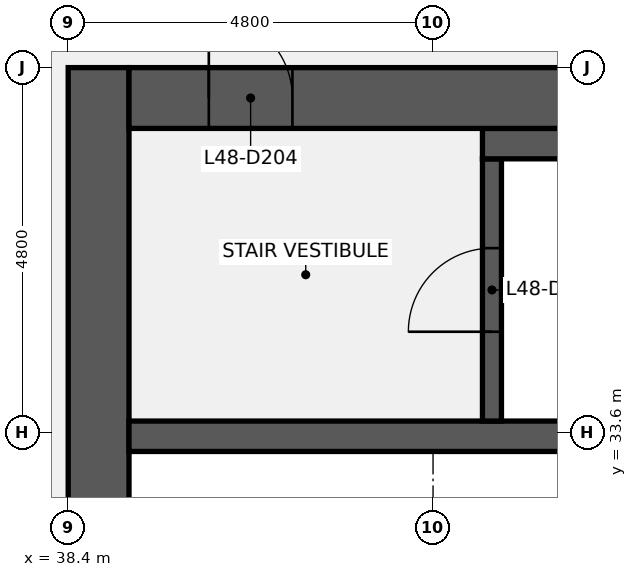
"""IFC4 building model, lengths in metres.
Left out: names, types, materials, properties, quantities, classifications, styles, units other than length and angle.
Written with IfcOpenShell. Run it as: python <this file> out.ifc"""

import sys

from ifc_helpers import new_model, si_unit, direction, frame, frame_2d, origin, place, context, subcontext, project, spatial, rectangle, extrude, element, fill, save


model = new_model("IFC4")
c1 = context("Model", 3, precision=1e-05, world=origin(), true_north=direction((0.0, 1.0)))
c2 = subcontext(c1, "Body", "Model", "MODEL_VIEW")
j1 = project(units=[si_unit("LENGTHUNIT", "METRE"), si_unit("PLANEANGLEUNIT", "RADIAN")], contexts=[c1])
p1 = place(None, origin())
s1 = spatial("IfcSite", under=j1, at=p1, CompositionType="ELEMENT")
p2 = place(p1, origin())
s2 = spatial("IfcBuilding", under=s1, at=p2, CompositionType="ELEMENT")
p3 = place(p2, frame((0.0, 0.0, 221.2)))
s3 = spatial("IfcBuildingStorey", under=s2, at=p3, CompositionType="ELEMENT", Elevation=221.2)
p4 = place(p3, frame((38.8, 9.6, 0.0), z_axis=(0.0, 0.0, 1.0), x_axis=(0.0, 1.0, 0.0)))
e1 = element("IfcWall", 1, at=p4, inside=s3, PredefinedType="SHEAR", context=c2, shape_type="SweptSolid", body=[
    extrude(rectangle(XDim=28.8, YDim=0.8, at=frame_2d((14.4, 0.0))), origin(), (0.0, 0.0, 1.0), 3.84),
])
p5 = place(p4, frame((8.7, 0.0, 0.0)))
e2 = element("IfcOpeningElement", 2, at=p5, cuts=e1, PredefinedType="OPENING", context=c2, shape_type="SweptSolid", body=[
    extrude(rectangle(XDim=1.8, YDim=2.1, at=frame_2d((0.9, 1.05))), frame((0.0, 0.41, 0.0), z_axis=(0.0, -1.0, 0.0), x_axis=(1.0, 0.0, 0.0)), (0.0, 0.0, 1.0), 0.82),
])
p6 = place(p4, frame((18.3, 0.0, 0.0)))
e3 = element("IfcOpeningElement", 3, at=p6, cuts=e1, PredefinedType="OPENING", context=c2, shape_type="SweptSolid", body=[
    extrude(rectangle(XDim=1.8, YDim=2.1, at=frame_2d((0.9, 1.05))), frame((0.0, 0.41, 0.0), z_axis=(0.0, -1.0, 0.0), x_axis=(1.0, 0.0, 0.0)), (0.0, 0.0, 1.0), 0.82),
])
p7 = place(p3, frame((39.2, 33.55, 0.0), z_axis=(0.0, 0.0, 1.0), x_axis=(1.0, 0.0, 0.0)))
e4 = element("IfcWall", 4, at=p7, inside=s3, PredefinedType="SHEAR", context=c2, shape_type="SweptSolid", body=[
    extrude(rectangle(XDim=17.6, YDim=0.4, at=frame_2d((8.8, 0.0))), origin(), (0.0, 0.0, 1.0), 3.84),
])
p8 = place(p3, frame((43.975, 33.75, 0.0), z_axis=(0.0, 0.0, 1.0), x_axis=(0.0, 1.0, 0.0)))
e5 = element("IfcWall", 5, at=p8, inside=s3, PredefinedType="SHEAR", context=c2, shape_type="SweptSolid", body=[
    extrude(rectangle(XDim=3.45, YDim=0.25, at=frame_2d((1.725, 0.0))), origin(), (0.0, 0.0, 1.0), 3.84),
])
p9 = place(p8, frame((1.175, 0.0, 0.0)))
e6 = element("IfcOpeningElement", 6, at=p9, cuts=e5, PredefinedType="OPENING", context=c2, shape_type="SweptSolid", body=[
    extrude(rectangle(XDim=1.1, YDim=2.1, at=frame_2d((0.55, 1.05))), frame((0.0, 0.135, 0.0), z_axis=(0.0, -1.0, 0.0), x_axis=(1.0, 0.0, 0.0)), (0.0, 0.0, 1.0), 0.27),
])
p10 = place(p3, frame((43.85, 37.4, 0.0), z_axis=(0.0, 0.0, 1.0), x_axis=(1.0, 0.0, 0.0)))
e7 = element("IfcWall", 7, at=p10, inside=s3, PredefinedType="SHEAR", context=c2, shape_type="SweptSolid", body=[
    extrude(rectangle(XDim=4.15, YDim=0.4, at=frame_2d((2.075, 0.0))), origin(), (0.0, 0.0, 1.0), 3.84),
])
p11 = place(p3, frame((39.2, 38.0, 0.0), z_axis=(0.0, 0.0, 1.0), x_axis=(1.0, 0.0, 0.0)))
e8 = element("IfcWall", 8, at=p11, inside=s3, PredefinedType="SHEAR", context=c2, shape_type="SweptSolid", body=[
    extrude(rectangle(XDim=8.8, YDim=0.8, at=frame_2d((4.4, 0.0))), origin(), (0.0, 0.0, 1.0), 3.84),
])
p12 = place(p11, frame((1.05, 0.0, 0.0)))
e9 = element("IfcOpeningElement", 9, at=p12, cuts=e8, PredefinedType="OPENING", context=c2, shape_type="SweptSolid", body=[
    extrude(rectangle(XDim=1.1, YDim=2.1, at=frame_2d((0.55, 1.05))), frame((0.0, 0.41, 0.0), z_axis=(0.0, -1.0, 0.0), x_axis=(1.0, 0.0, 0.0)), (0.0, 0.0, 1.0), 0.82),
])
p13 = place(p9, origin())
e10 = element("IfcDoor", 10, at=p13, inside=s3, OperationType="SINGLE_SWING_LEFT", PredefinedType="DOOR", context=c2, shape_type="SweptSolid", body=[
    extrude(rectangle(XDim=1.1, YDim=2.1, at=frame_2d((0.55, 1.05))), frame((0.0, 0.025, 0.0), z_axis=(0.0, -1.0, 0.0), x_axis=(1.0, 0.0, 0.0)), (0.0, 0.0, 1.0), 0.05),
])
fill(e6, e10)
p14 = place(p12, origin())
e11 = element("IfcDoor", 11, at=p14, inside=s3, OperationType="SINGLE_SWING_LEFT", PredefinedType="DOOR", context=c2, shape_type="SweptSolid", body=[
    extrude(rectangle(XDim=1.1, YDim=2.1, at=frame_2d((0.55, 1.05))), frame((0.0, 0.025, 0.0), z_axis=(0.0, -1.0, 0.0), x_axis=(1.0, 0.0, 0.0)), (0.0, 0.0, 1.0), 0.05),
])
fill(e9, e11)
save(model, sys.argv[1])
